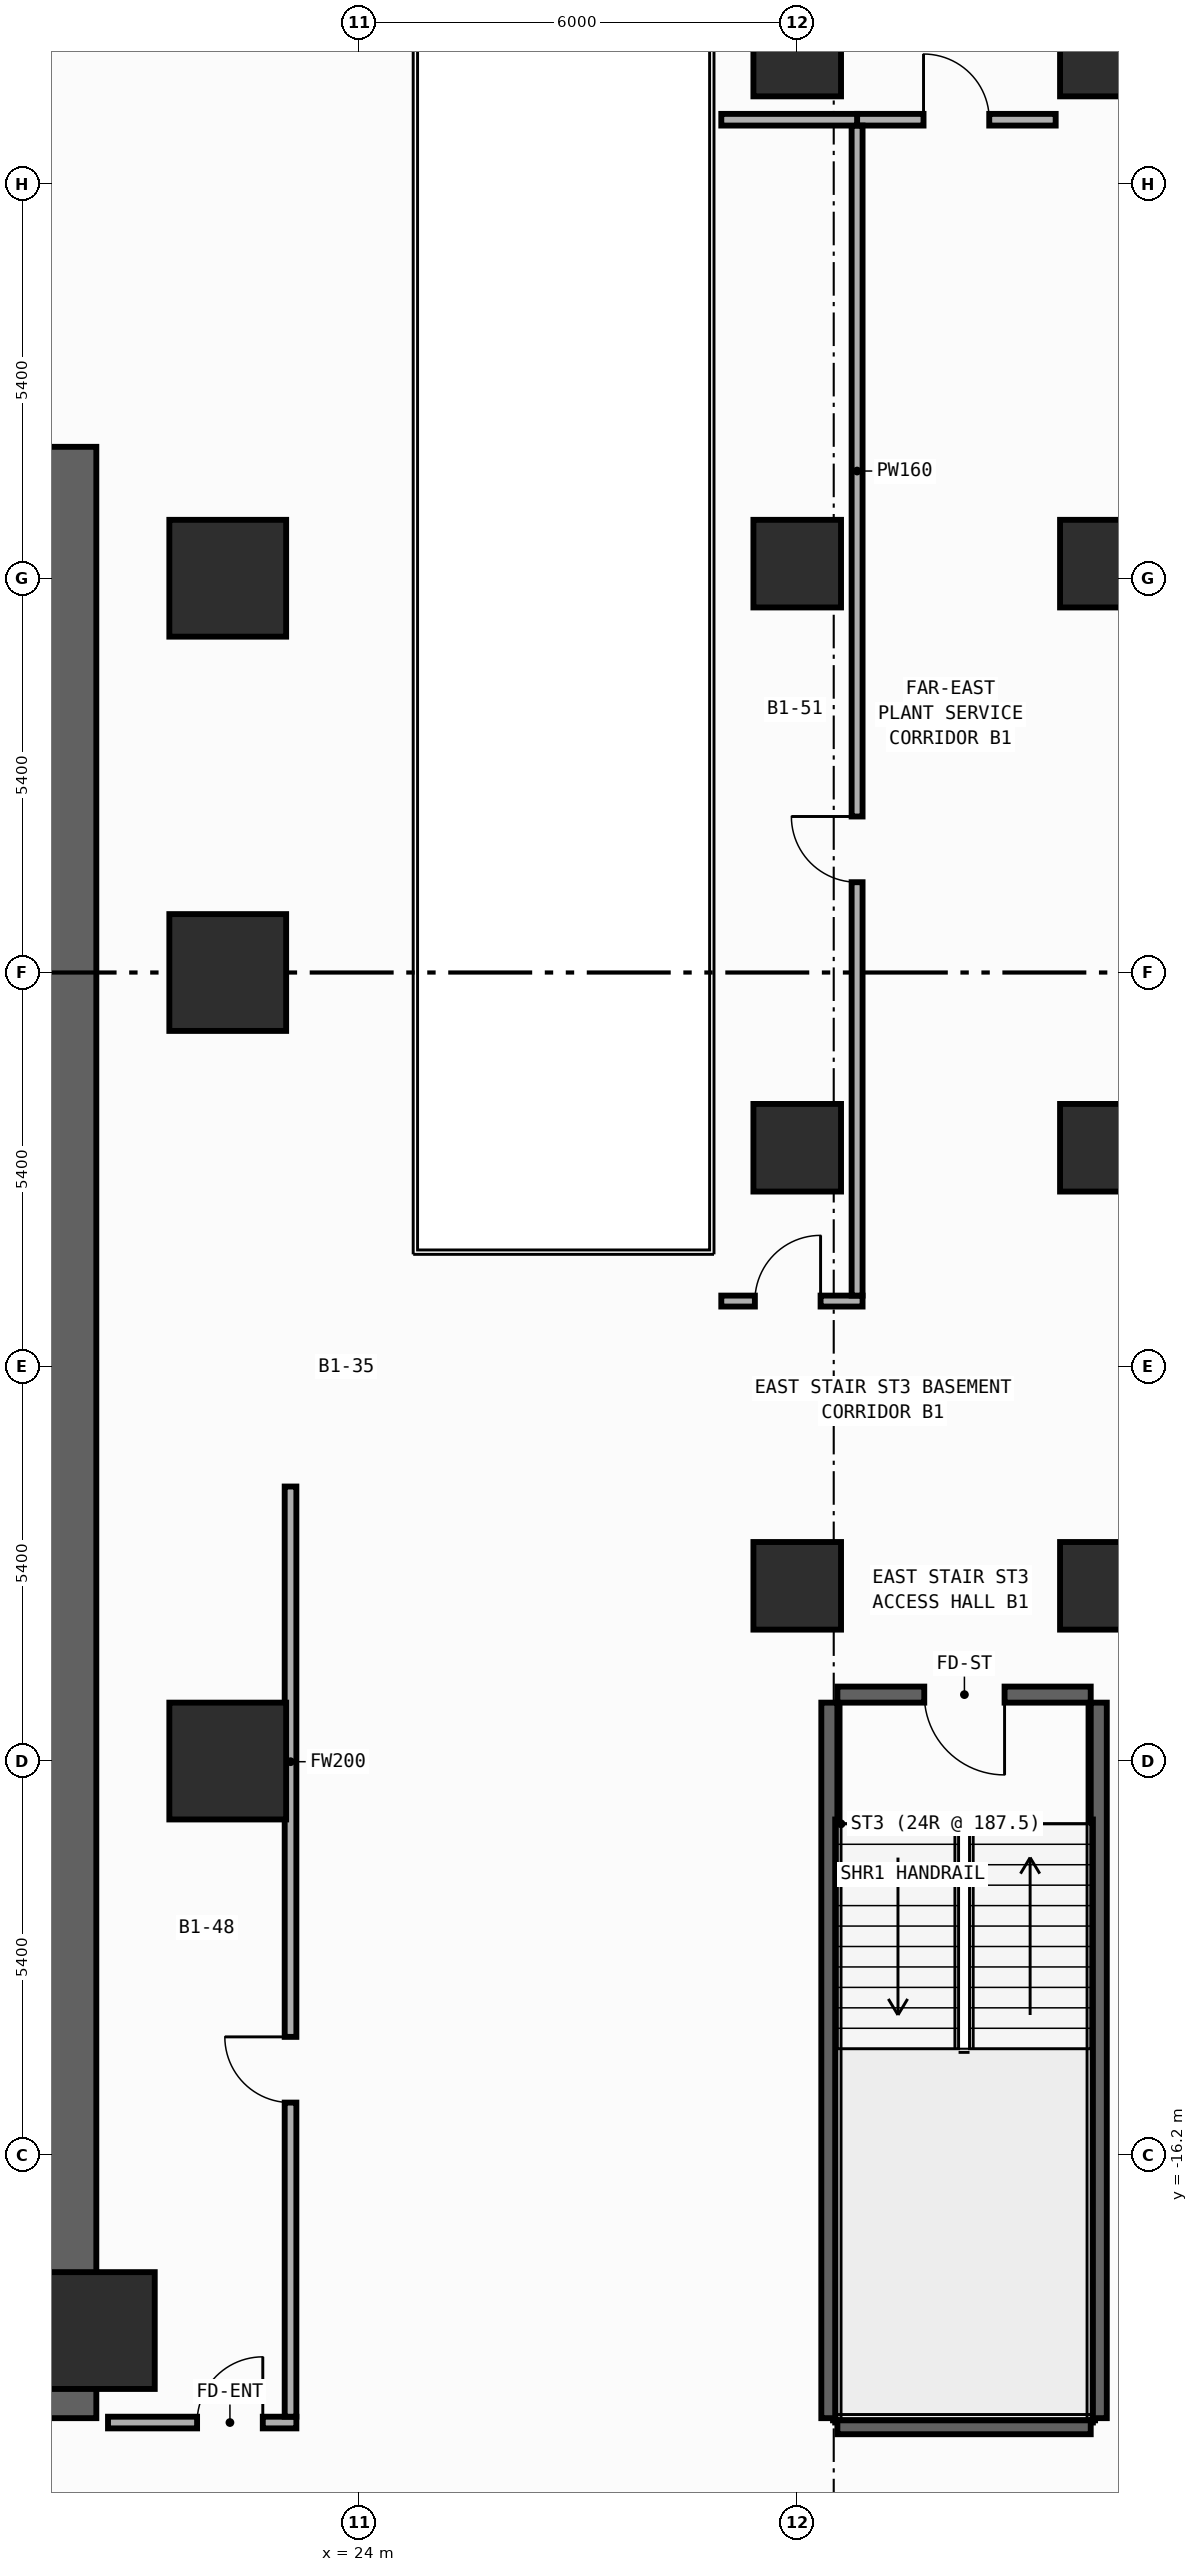
"""IFC4 building model, lengths in metres.
Left out: names, types, materials, properties, quantities, classifications, styles, units other than length and angle.
Written with IfcOpenShell. Run it as: python <this file> out.ifc"""

import sys

from ifc_helpers import new_model, si_unit, direction, frame, frame_2d, origin, origin_2d, place, context, subcontext, project, spatial, rectangle, extrude, element, fill, save


model = new_model("IFC4")
c1 = context("Model", 3, precision=1e-05, world=origin(), true_north=direction((0.0, 1.0)))
c2 = subcontext(c1, "Body", "Model", "MODEL_VIEW")
j1 = project(units=[si_unit("LENGTHUNIT", "METRE"), si_unit("PLANEANGLEUNIT", "RADIAN")], contexts=[c1])
p1 = place(None, origin())
s1 = spatial("IfcSite", under=j1, at=p1, CompositionType="ELEMENT")
p2 = place(p1, origin())
s2 = spatial("IfcBuilding", under=s1, at=p2, CompositionType="ELEMENT")
p3 = place(p2, frame((0.0, 0.0, -4.5)))
s3 = spatial("IfcBuildingStorey", under=s2, at=p3, CompositionType="ELEMENT", Elevation=-4.5)
p4 = place(p3, frame((20.0, -19.8, 0.0), z_axis=(0.0, 0.0, 1.0), x_axis=(0.0, 1.0, 0.0)))
e1 = element("IfcWall", 1, at=p4, inside=s3, PredefinedType="SHEAR", context=c2, shape_type="SweptSolid", body=[
    extrude(rectangle(XDim=27.0, YDim=0.8, at=frame_2d((13.5, 0.0))), origin(), (0.0, 0.0, 1.0), 4.2),
])
p5 = place(p3, frame((34.02, -9.89, 0.0), z_axis=(0.0, 0.0, 1.0), x_axis=(-1.0, 0.0, 0.0)))
e2 = element("IfcWall", 2, at=p5, inside=s3, PredefinedType="SHEAR", context=c2, shape_type="SweptSolid", body=[
    extrude(rectangle(XDim=3.47, YDim=0.22, at=frame_2d((1.735, 0.0))), origin(), (0.0, 0.0, 1.0), 4.2),
])
p6 = place(p5, frame((1.18, 0.0, 0.0)))
e3 = element("IfcOpeningElement", 3, at=p6, cuts=e2, PredefinedType="OPENING", context=c2, shape_type="SweptSolid", body=[
    extrude(rectangle(XDim=1.1, YDim=2.2, at=frame_2d((0.55, 1.1))), frame((0.0, 0.12, 0.0), z_axis=(0.0, -1.0, 0.0), x_axis=(1.0, 0.0, 0.0)), (0.0, 0.0, 1.0), 0.24),
])
p7 = place(p3, frame((30.55, -19.91, 0.0), z_axis=(0.0, 0.0, 1.0), x_axis=(1.0, 0.0, 0.0)))
e4 = element("IfcWall", 4, at=p7, inside=s3, PredefinedType="SHEAR", context=c2, shape_type="SweptSolid", body=[
    extrude(rectangle(XDim=3.47, YDim=0.22, at=frame_2d((1.735, 0.0))), origin(), (0.0, 0.0, 1.0), 4.2),
])
for number, where, z_axis, x_axis in (
    (5, (30.44, -19.8, 0.0), (0.0, 0.0, 1.0), (0.0, 1.0, 0.0)),
    (6, (34.13, -19.8, 0.0), (0.0, 0.0, 1.0), (0.0, 1.0, 0.0)),
):
    element("IfcWall", number, at=place(p3, frame(where, z_axis=z_axis, x_axis=x_axis)), inside=s3, PredefinedType="SHEAR", context=c2, shape_type="SweptSolid", body=[
        extrude(rectangle(XDim=9.8, YDim=0.22, at=frame_2d((4.9, 0.0))), origin(), (0.0, 0.0, 1.0), 4.2),
    ])
p8 = place(p3, frame((20.4, -18.6, 0.0), z_axis=(0.0, 0.0, 1.0), x_axis=(1.0, 0.0, 0.0)))
e7 = element("IfcColumn", 7, at=p8, inside=s3, PredefinedType="COLUMN", context=c2, shape_type="SweptSolid", body=[
    extrude(rectangle(XDim=1.6, YDim=1.6, at=origin_2d()), origin(), (0.0, 0.0, 1.0), 4.5),
])
for number, where, z_axis, x_axis in (
    (8, (30.0, -8.4, 0.0), (0.0, 0.0, 1.0), (1.0, 0.0, 0.0)),
    (9, (30.0, -2.4, 0.0), (0.0, 0.0, 1.0), (1.0, 0.0, 0.0)),
    (10, (30.0, 5.6, 0.0), (0.0, 0.0, 1.0), (1.0, 0.0, 0.0)),
    (11, (30.0, 12.6, 0.0), (0.0, 0.0, 1.0), (1.0, 0.0, 0.0)),
    (12, (34.2, -8.4, 0.0), (0.0, 0.0, 1.0), (1.0, 0.0, 0.0)),
    (13, (34.2, -2.4, 0.0), (0.0, 0.0, 1.0), (1.0, 0.0, 0.0)),
    (14, (34.2, 5.6, 0.0), (0.0, 0.0, 1.0), (1.0, 0.0, 0.0)),
    (15, (34.2, 12.6, 0.0), (0.0, 0.0, 1.0), (1.0, 0.0, 0.0)),
):
    element("IfcColumn", number, at=place(p3, frame(where, z_axis=z_axis, x_axis=x_axis)), inside=s3, PredefinedType="COLUMN", context=c2, shape_type="SweptSolid", body=[
        extrude(rectangle(XDim=1.2, YDim=1.2, at=origin_2d()), origin(), (0.0, 0.0, 1.0), 4.5),
    ])
for number, where, z_axis, x_axis in (
    (16, (22.2, -10.8, 0.0), (0.0, 0.0, 1.0), (1.0, 0.0, 0.0)),
    (17, (22.2, 0.0, 0.0), (0.0, 0.0, 1.0), (1.0, 0.0, 0.0)),
    (18, (22.2, 5.4, 0.0), (0.0, 0.0, 1.0), (1.0, 0.0, 0.0)),
):
    element("IfcColumn", number, at=place(p3, frame(where, z_axis=z_axis, x_axis=x_axis)), inside=s3, PredefinedType="COLUMN", context=c2, shape_type="SweptSolid", body=[
        extrude(rectangle(XDim=1.6, YDim=1.6, at=origin_2d()), origin(), (0.0, 0.0, 1.0), 4.5),
    ])
p9 = place(p3, frame((20.56, -19.86, 0.0), z_axis=(0.0, 0.0, 1.0), x_axis=(1.0, 0.0, 0.0)))
e19 = element("IfcWall", 19, at=p9, inside=s3, PredefinedType="PARTITIONING", context=c2, shape_type="SweptSolid", body=[
    extrude(rectangle(XDim=2.58, YDim=0.16, at=frame_2d((1.29, 0.0))), origin(), (0.0, 0.0, 1.0), 4.2),
])
p10 = place(p9, frame((1.22, 0.0, 0.0)))
e20 = element("IfcOpeningElement", 20, at=p10, cuts=e19, PredefinedType="OPENING", context=c2, shape_type="SweptSolid", body=[
    extrude(rectangle(XDim=0.9, YDim=2.15, at=frame_2d((0.45, 1.075))), frame((0.0, 0.09, 0.0), z_axis=(0.0, -1.0, 0.0), x_axis=(1.0, 0.0, 0.0)), (0.0, 0.0, 1.0), 0.18),
])
p11 = place(p3, frame((23.06, -19.78, 0.0), z_axis=(0.0, 0.0, 1.0), x_axis=(0.0, 1.0, 0.0)))
e21 = element("IfcWall", 21, at=p11, inside=s3, PredefinedType="PARTITIONING", context=c2, shape_type="SweptSolid", body=[
    extrude(rectangle(XDim=12.74, YDim=0.16, at=frame_2d((6.37, 0.0))), origin(), (0.0, 0.0, 1.0), 4.2),
])
p12 = place(p11, frame((4.302, 0.0, 0.0)))
e22 = element("IfcOpeningElement", 22, at=p12, cuts=e21, PredefinedType="OPENING", context=c2, shape_type="SweptSolid", body=[
    extrude(rectangle(XDim=0.9, YDim=2.15, at=frame_2d((0.45, 1.075))), frame((0.0, 0.09, 0.0), z_axis=(0.0, -1.0, 0.0), x_axis=(1.0, 0.0, 0.0)), (0.0, 0.0, 1.0), 0.18),
])
p13 = place(p3, frame((28.96, -4.5, 0.0), z_axis=(0.0, 0.0, 1.0), x_axis=(1.0, 0.0, 0.0)))
e23 = element("IfcWall", 23, at=p13, inside=s3, PredefinedType="PARTITIONING", context=c2, shape_type="SweptSolid", body=[
    extrude(rectangle(XDim=1.935, YDim=0.15, at=frame_2d((0.968, 0.0))), origin(), (0.0, 0.0, 1.0), 4.2),
])
p14 = place(p13, frame((0.46, 0.0, 0.0)))
e24 = element("IfcOpeningElement", 24, at=p14, cuts=e23, PredefinedType="OPENING", context=c2, shape_type="SweptSolid", body=[
    extrude(rectangle(XDim=0.9, YDim=2.15, at=frame_2d((0.45, 1.075))), frame((0.0, 0.085, 0.0), z_axis=(0.0, -1.0, 0.0), x_axis=(1.0, 0.0, 0.0)), (0.0, 0.0, 1.0), 0.17),
])
p15 = place(p3, frame((30.82, 11.68, 0.0), z_axis=(0.0, 0.0, 1.0), x_axis=(1.0, 0.0, 0.0)))
e25 = element("IfcWall", 25, at=p15, inside=s3, PredefinedType="PARTITIONING", context=c2, shape_type="SweptSolid", body=[
    extrude(rectangle(XDim=2.72, YDim=0.16, at=frame_2d((1.36, 0.0))), origin(), (0.0, 0.0, 1.0), 4.2),
])
p16 = place(p15, frame((0.91, 0.0, 0.0)))
e26 = element("IfcOpeningElement", 26, at=p16, cuts=e25, PredefinedType="OPENING", context=c2, shape_type="SweptSolid", body=[
    extrude(rectangle(XDim=0.9, YDim=2.15, at=frame_2d((0.45, 1.075))), frame((0.0, 0.09, 0.0), z_axis=(0.0, -1.0, 0.0), x_axis=(1.0, 0.0, 0.0)), (0.0, 0.0, 1.0), 0.18),
])
p17 = place(p3, frame((30.82, -4.425, 0.0), z_axis=(0.0, 0.0, 1.0), x_axis=(0.0, 1.0, 0.0)))
e27 = element("IfcWall", 27, at=p17, inside=s3, PredefinedType="PARTITIONING", context=c2, shape_type="SweptSolid", body=[
    extrude(rectangle(XDim=16.025, YDim=0.15, at=frame_2d((8.013, 0.0))), origin(), (0.0, 0.0, 1.0), 4.2),
])
p18 = place(p17, frame((5.662, 0.0, 0.0)))
e28 = element("IfcOpeningElement", 28, at=p18, cuts=e27, PredefinedType="OPENING", context=c2, shape_type="SweptSolid", body=[
    extrude(rectangle(XDim=0.9, YDim=2.15, at=frame_2d((0.45, 1.075))), frame((0.0, 0.085, 0.0), z_axis=(0.0, -1.0, 0.0), x_axis=(1.0, 0.0, 0.0)), (0.0, 0.0, 1.0), 0.17),
])
p19 = place(p3, frame((28.96, 11.68, 0.0), z_axis=(0.0, 0.0, 1.0), x_axis=(1.0, 0.0, 0.0)))
e29 = element("IfcWall", 29, at=p19, inside=s3, PredefinedType="PARTITIONING", context=c2, shape_type="SweptSolid", body=[
    extrude(rectangle(XDim=1.86, YDim=0.16, at=frame_2d((0.93, 0.0))), origin(), (0.0, 0.0, 1.0), 4.2),
])
p20 = place(p6, origin())
e30 = element("IfcDoor", 30, at=p20, inside=s3, OperationType="SINGLE_SWING_LEFT", PredefinedType="DOOR", context=c2, shape_type="SweptSolid", body=[
    extrude(rectangle(XDim=1.1, YDim=2.2, at=frame_2d((0.55, 1.1))), frame((0.0, 0.025, 0.0), z_axis=(0.0, -1.0, 0.0), x_axis=(1.0, 0.0, 0.0)), (0.0, 0.0, 1.0), 0.05),
])
fill(e3, e30)
p21 = place(p10, origin())
e31 = element("IfcDoor", 31, at=p21, inside=s3, OperationType="SINGLE_SWING_RIGHT", PredefinedType="DOOR", context=c2, shape_type="SweptSolid", body=[
    extrude(rectangle(XDim=0.9, YDim=2.15, at=frame_2d((0.45, 1.075))), frame((0.0, 0.025, 0.0), z_axis=(0.0, -1.0, 0.0), x_axis=(1.0, 0.0, 0.0)), (0.0, 0.0, 1.0), 0.05),
])
fill(e20, e31)
p22 = place(p12, origin())
e32 = element("IfcDoor", 32, at=p22, inside=s3, OperationType="SINGLE_SWING_RIGHT", PredefinedType="DOOR", context=c2, shape_type="SweptSolid", body=[
    extrude(rectangle(XDim=0.9, YDim=2.15, at=frame_2d((0.45, 1.075))), frame((0.0, 0.025, 0.0), z_axis=(0.0, -1.0, 0.0), x_axis=(1.0, 0.0, 0.0)), (0.0, 0.0, 1.0), 0.05),
])
fill(e22, e32)
p23 = place(p14, origin())
e33 = element("IfcDoor", 33, at=p23, inside=s3, OperationType="SINGLE_SWING_RIGHT", PredefinedType="DOOR", context=c2, shape_type="SweptSolid", body=[
    extrude(rectangle(XDim=0.9, YDim=2.15, at=frame_2d((0.45, 1.075))), frame((0.0, 0.025, 0.0), z_axis=(0.0, -1.0, 0.0), x_axis=(1.0, 0.0, 0.0)), (0.0, 0.0, 1.0), 0.05),
])
fill(e24, e33)
p24 = place(p16, origin())
e34 = element("IfcDoor", 34, at=p24, inside=s3, OperationType="SINGLE_SWING_LEFT", PredefinedType="DOOR", context=c2, shape_type="SweptSolid", body=[
    extrude(rectangle(XDim=0.9, YDim=2.15, at=frame_2d((0.45, 1.075))), frame((0.0, 0.025, 0.0), z_axis=(0.0, -1.0, 0.0), x_axis=(1.0, 0.0, 0.0)), (0.0, 0.0, 1.0), 0.05),
])
fill(e26, e34)
p25 = place(p18, origin())
e35 = element("IfcDoor", 35, at=p25, inside=s3, OperationType="SINGLE_SWING_RIGHT", PredefinedType="DOOR", context=c2, shape_type="SweptSolid", body=[
    extrude(rectangle(XDim=0.9, YDim=2.15, at=frame_2d((0.45, 1.075))), frame((0.0, 0.025, 0.0), z_axis=(0.0, -1.0, 0.0), x_axis=(1.0, 0.0, 0.0)), (0.0, 0.0, 1.0), 0.05),
])
fill(e28, e35)
save(model, sys.argv[1])
